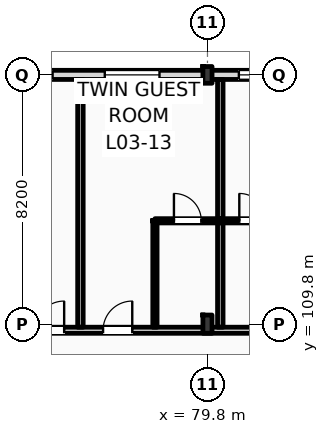
"""IFC4 building model, lengths in metres.
Left out: names, types, materials, properties, quantities, classifications, styles, units other than length and angle.
Written with IfcOpenShell. Run it as: python <this file> out.ifc"""

import sys

from ifc_helpers import new_model, si_unit, direction, frame, frame_2d, origin, origin_2d, place, context, subcontext, project, spatial, rectangle, i_section, extrude, element, fill, save


model = new_model("IFC4")
c1 = context("Model", 3, precision=1e-05, world=origin(), true_north=direction((0.0, 1.0)))
c2 = subcontext(c1, "Body", "Model", "MODEL_VIEW")
j1 = project(units=[si_unit("LENGTHUNIT", "METRE"), si_unit("PLANEANGLEUNIT", "RADIAN")], contexts=[c1])
p1 = place(None, origin())
s1 = spatial("IfcSite", under=j1, at=p1, CompositionType="ELEMENT")
p2 = place(p1, origin())
s2 = spatial("IfcBuilding", under=s1, at=p2, CompositionType="ELEMENT")
p3 = place(p2, frame((0.0, 0.0, 16.2)))
s3 = spatial("IfcBuildingStorey", under=s2, at=p3, CompositionType="ELEMENT", Elevation=16.2)
p4 = place(p3, frame((79.8, 109.8, 0.0), z_axis=(0.0, 0.0, 1.0), x_axis=(1.0, 0.0, 0.0)))
e1 = element("IfcColumn", 1, at=p4, inside=s3, PredefinedType="COLUMN", context=c2, shape_type="SweptSolid", body=[
    extrude(i_section(OverallWidth=0.3, OverallDepth=0.6, WebThickness=0.015, FlangeThickness=0.03, FilletRadius=0.027, at=origin_2d()), origin(), (0.0, 0.0, 1.0), 4.2),
])
p5 = place(p3, frame((79.8, 118.0, 0.0), z_axis=(0.0, 0.0, 1.0), x_axis=(1.0, 0.0, 0.0)))
e2 = element("IfcColumn", 2, at=p5, inside=s3, PredefinedType="COLUMN", context=c2, shape_type="SweptSolid", body=[
    extrude(i_section(OverallWidth=0.3, OverallDepth=0.55, WebThickness=0.015, FlangeThickness=0.029, FilletRadius=0.027, at=origin_2d()), origin(), (0.0, 0.0, 1.0), 4.2),
])
p6 = place(p3, frame((22.5, 118.0, 0.0), z_axis=(0.0, 0.0, 1.0), x_axis=(1.0, 0.0, 0.0)))
e3 = element("IfcWall", 3, at=p6, inside=s3, PredefinedType="STANDARD", context=c2, shape_type="SweptSolid", body=[
    extrude(rectangle(XDim=97.5, YDim=0.3, at=frame_2d((48.75, 0.0))), origin(), (0.0, 0.0, 1.0), 3.36),
])
p7 = place(p6, frame((3.721, 0.0, 0.9)))
e4 = element("IfcOpeningElement", 4, at=p7, cuts=e3, PredefinedType="OPENING", context=c2, shape_type="SweptSolid", body=[
    extrude(rectangle(XDim=0.9, YDim=1.8, at=frame_2d((0.45, 0.9))), frame((0.0, 0.16, 0.0), z_axis=(0.0, -1.0, 0.0), x_axis=(1.0, 0.0, 0.0)), (0.0, 0.0, 1.0), 0.32),
])
p8 = place(p6, frame((6.447, 0.0, 0.9)))
e5 = element("IfcOpeningElement", 5, at=p8, cuts=e3, PredefinedType="OPENING", context=c2, shape_type="SweptSolid", body=[
    extrude(rectangle(XDim=1.35, YDim=1.85, at=frame_2d((0.675, 0.925))), frame((0.0, 0.16, 0.0), z_axis=(0.0, -1.0, 0.0), x_axis=(1.0, 0.0, 0.0)), (0.0, 0.0, 1.0), 0.32),
])
p9 = place(p6, frame((11.363, 0.0, 0.9)))
e6 = element("IfcOpeningElement", 6, at=p9, cuts=e3, PredefinedType="OPENING", context=c2, shape_type="SweptSolid", body=[
    extrude(rectangle(XDim=1.5, YDim=1.9, at=frame_2d((0.75, 0.95))), frame((0.0, 0.16, 0.0), z_axis=(0.0, -1.0, 0.0), x_axis=(1.0, 0.0, 0.0)), (0.0, 0.0, 1.0), 0.32),
])
p10 = place(p6, frame((15.078, 0.0, 0.9)))
e7 = element("IfcOpeningElement", 7, at=p10, cuts=e3, PredefinedType="OPENING", context=c2, shape_type="SweptSolid", body=[
    extrude(rectangle(XDim=1.65, YDim=1.95, at=frame_2d((0.825, 0.975))), frame((0.0, 0.16, 0.0), z_axis=(0.0, -1.0, 0.0), x_axis=(1.0, 0.0, 0.0)), (0.0, 0.0, 1.0), 0.32),
])
p11 = place(p6, frame((19.395, 0.0, 0.9)))
e8 = element("IfcOpeningElement", 8, at=p11, cuts=e3, PredefinedType="OPENING", context=c2, shape_type="SweptSolid", body=[
    extrude(rectangle(XDim=1.8, YDim=2.0, at=frame_2d((0.9, 1.0))), frame((0.0, 0.16, 0.0), z_axis=(0.0, -1.0, 0.0), x_axis=(1.0, 0.0, 0.0)), (0.0, 0.0, 1.0), 0.32),
])
p12 = place(p6, frame((23.31, 0.0, 0.9)))
e9 = element("IfcOpeningElement", 9, at=p12, cuts=e3, PredefinedType="OPENING", context=c2, shape_type="SweptSolid", body=[
    extrude(rectangle(XDim=1.95, YDim=2.05, at=frame_2d((0.975, 1.025))), frame((0.0, 0.16, 0.0), z_axis=(0.0, -1.0, 0.0), x_axis=(1.0, 0.0, 0.0)), (0.0, 0.0, 1.0), 0.32),
])
p13 = place(p6, frame((28.026, 0.0, 0.9)))
e10 = element("IfcOpeningElement", 10, at=p13, cuts=e3, PredefinedType="OPENING", context=c2, shape_type="SweptSolid", body=[
    extrude(rectangle(XDim=2.1, YDim=2.1, at=frame_2d((1.05, 1.05))), frame((0.0, 0.16, 0.0), z_axis=(0.0, -1.0, 0.0), x_axis=(1.0, 0.0, 0.0)), (0.0, 0.0, 1.0), 0.32),
])
p14 = place(p6, frame((31.941, 0.0, 0.9)))
e11 = element("IfcOpeningElement", 11, at=p14, cuts=e3, PredefinedType="OPENING", context=c2, shape_type="SweptSolid", body=[
    extrude(rectangle(XDim=1.1, YDim=2.15, at=frame_2d((0.55, 1.075))), frame((0.0, 0.16, 0.0), z_axis=(0.0, -1.0, 0.0), x_axis=(1.0, 0.0, 0.0)), (0.0, 0.0, 1.0), 0.32),
])
p15 = place(p6, frame((36.657, 0.0, 0.9)))
e12 = element("IfcOpeningElement", 12, at=p15, cuts=e3, PredefinedType="OPENING", context=c2, shape_type="SweptSolid", body=[
    extrude(rectangle(XDim=2.4, YDim=2.2, at=frame_2d((1.2, 1.1))), frame((0.0, 0.16, 0.0), z_axis=(0.0, -1.0, 0.0), x_axis=(1.0, 0.0, 0.0)), (0.0, 0.0, 1.0), 0.32),
])
p16 = place(p6, frame((42.574, 0.0, 0.9)))
e13 = element("IfcOpeningElement", 13, at=p16, cuts=e3, PredefinedType="OPENING", context=c2, shape_type="SweptSolid", body=[
    extrude(rectangle(XDim=1.35, YDim=2.25, at=frame_2d((0.675, 1.125))), frame((0.0, 0.16, 0.0), z_axis=(0.0, -1.0, 0.0), x_axis=(1.0, 0.0, 0.0)), (0.0, 0.0, 1.0), 0.32),
])
p17 = place(p6, frame((45.289, 0.0, 0.9)))
e14 = element("IfcOpeningElement", 14, at=p17, cuts=e3, PredefinedType="OPENING", context=c2, shape_type="SweptSolid", body=[
    extrude(rectangle(XDim=2.7, YDim=2.28, at=frame_2d((1.35, 1.14))), frame((0.0, 0.16, 0.0), z_axis=(0.0, -1.0, 0.0), x_axis=(1.0, 0.0, 0.0)), (0.0, 0.0, 1.0), 0.32),
])
p18 = place(p6, frame((50.406, 0.0, 0.9)))
e15 = element("IfcOpeningElement", 15, at=p18, cuts=e3, PredefinedType="OPENING", context=c2, shape_type="SweptSolid", body=[
    extrude(rectangle(XDim=1.8, YDim=2.28, at=frame_2d((0.9, 1.14))), frame((0.0, 0.16, 0.0), z_axis=(0.0, -1.0, 0.0), x_axis=(1.0, 0.0, 0.0)), (0.0, 0.0, 1.0), 0.32),
])
p19 = place(p6, frame((53.922, 0.0, 0.9)))
e16 = element("IfcOpeningElement", 16, at=p19, cuts=e3, PredefinedType="OPENING", context=c2, shape_type="SweptSolid", body=[
    extrude(rectangle(XDim=1.8, YDim=2.28, at=frame_2d((0.9, 1.14))), frame((0.0, 0.16, 0.0), z_axis=(0.0, -1.0, 0.0), x_axis=(1.0, 0.0, 0.0)), (0.0, 0.0, 1.0), 0.32),
])
p20 = place(p6, frame((58.332, 0.0, 0.9)))
e17 = element("IfcOpeningElement", 17, at=p20, cuts=e3, PredefinedType="OPENING", context=c2, shape_type="SweptSolid", body=[
    extrude(rectangle(XDim=2.961, YDim=2.28, at=frame_2d((1.48, 1.14))), frame((0.0, 0.16, 0.0), z_axis=(0.0, -1.0, 0.0), x_axis=(1.0, 0.0, 0.0)), (0.0, 0.0, 1.0), 0.32),
])
p21 = place(p6, frame((62.513, 0.0, 0.9)))
e18 = element("IfcOpeningElement", 18, at=p21, cuts=e3, PredefinedType="OPENING", context=c2, shape_type="SweptSolid", body=[
    extrude(rectangle(XDim=1.8, YDim=2.28, at=frame_2d((0.9, 1.14))), frame((0.0, 0.16, 0.0), z_axis=(0.0, -1.0, 0.0), x_axis=(1.0, 0.0, 0.0)), (0.0, 0.0, 1.0), 0.32),
])
p22 = place(p6, frame((67.114, 0.0, 0.9)))
e19 = element("IfcOpeningElement", 19, at=p22, cuts=e3, PredefinedType="OPENING", context=c2, shape_type="SweptSolid", body=[
    extrude(rectangle(XDim=2.961, YDim=2.28, at=frame_2d((1.48, 1.14))), frame((0.0, 0.16, 0.0), z_axis=(0.0, -1.0, 0.0), x_axis=(1.0, 0.0, 0.0)), (0.0, 0.0, 1.0), 0.32),
])
p23 = place(p6, frame((73.695, 0.0, 0.9)))
e20 = element("IfcOpeningElement", 20, at=p23, cuts=e3, PredefinedType="OPENING", context=c2, shape_type="SweptSolid", body=[
    extrude(rectangle(XDim=1.1, YDim=2.28, at=frame_2d((0.55, 1.14))), frame((0.0, 0.16, 0.0), z_axis=(0.0, -1.0, 0.0), x_axis=(1.0, 0.0, 0.0)), (0.0, 0.0, 1.0), 0.32),
])
p24 = place(p6, frame((75.895, 0.0, 0.9)))
e21 = element("IfcOpeningElement", 21, at=p24, cuts=e3, PredefinedType="OPENING", context=c2, shape_type="SweptSolid", body=[
    extrude(rectangle(XDim=2.961, YDim=2.28, at=frame_2d((1.48, 1.14))), frame((0.0, 0.16, 0.0), z_axis=(0.0, -1.0, 0.0), x_axis=(1.0, 0.0, 0.0)), (0.0, 0.0, 1.0), 0.32),
])
p25 = place(p6, frame((81.676, 0.0, 0.9)))
e22 = element("IfcOpeningElement", 22, at=p25, cuts=e3, PredefinedType="OPENING", context=c2, shape_type="SweptSolid", body=[
    extrude(rectangle(XDim=1.8, YDim=2.28, at=frame_2d((0.9, 1.14))), frame((0.0, 0.16, 0.0), z_axis=(0.0, -1.0, 0.0), x_axis=(1.0, 0.0, 0.0)), (0.0, 0.0, 1.0), 0.32),
])
p26 = place(p6, frame((84.677, 0.0, 0.9)))
e23 = element("IfcOpeningElement", 23, at=p26, cuts=e3, PredefinedType="OPENING", context=c2, shape_type="SweptSolid", body=[
    extrude(rectangle(XDim=2.961, YDim=2.28, at=frame_2d((1.48, 1.14))), frame((0.0, 0.16, 0.0), z_axis=(0.0, -1.0, 0.0), x_axis=(1.0, 0.0, 0.0)), (0.0, 0.0, 1.0), 0.32),
])
p27 = place(p6, frame((89.999, 0.0, 0.9)))
e24 = element("IfcOpeningElement", 24, at=p27, cuts=e3, PredefinedType="OPENING", context=c2, shape_type="SweptSolid", body=[
    extrude(rectangle(XDim=1.1, YDim=1.5, at=frame_2d((0.55, 0.75))), frame((0.0, 0.16, 0.0), z_axis=(0.0, -1.0, 0.0), x_axis=(1.0, 0.0, 0.0)), (0.0, 0.0, 1.0), 0.32),
])
p28 = place(p6, frame((94.35, 0.0, 0.9)))
e25 = element("IfcOpeningElement", 25, at=p28, cuts=e3, PredefinedType="OPENING", context=c2, shape_type="SweptSolid", body=[
    extrude(rectangle(XDim=1.25, YDim=1.6, at=frame_2d((0.625, 0.8))), frame((0.0, 0.16, 0.0), z_axis=(0.0, -1.0, 0.0), x_axis=(1.0, 0.0, 0.0)), (0.0, 0.0, 1.0), 0.32),
])
p29 = place(p3, frame((10.65, 109.6, 0.0), z_axis=(0.0, 0.0, 1.0), x_axis=(1.0, 0.0, 0.0)))
e26 = element("IfcWall", 26, at=p29, inside=s3, PredefinedType="PARTITIONING", context=c2, shape_type="SweptSolid", body=[
    extrude(rectangle(XDim=109.21, YDim=0.2, at=frame_2d((54.605, 0.0))), origin(), (0.0, 0.0, 1.0), 3.36),
])
p30 = place(p29, frame((15.43, 0.0, 0.0)))
e27 = element("IfcOpeningElement", 27, at=p30, cuts=e26, PredefinedType="OPENING", context=c2, shape_type="SweptSolid", body=[
    extrude(rectangle(XDim=1.02, YDim=2.2, at=frame_2d((0.51, 1.1))), frame((0.0, 0.11, 0.0), z_axis=(0.0, -1.0, 0.0), x_axis=(1.0, 0.0, 0.0)), (0.0, 0.0, 1.0), 0.22),
])
p31 = place(p29, frame((19.537, 0.0, 0.0)))
e28 = element("IfcOpeningElement", 28, at=p31, cuts=e26, PredefinedType="OPENING", context=c2, shape_type="SweptSolid", body=[
    extrude(rectangle(XDim=1.02, YDim=2.2, at=frame_2d((0.51, 1.1))), frame((0.0, 0.11, 0.0), z_axis=(0.0, -1.0, 0.0), x_axis=(1.0, 0.0, 0.0)), (0.0, 0.0, 1.0), 0.22),
])
p32 = place(p29, frame((23.928, 0.0, 0.0)))
e29 = element("IfcOpeningElement", 29, at=p32, cuts=e26, PredefinedType="OPENING", context=c2, shape_type="SweptSolid", body=[
    extrude(rectangle(XDim=1.02, YDim=2.2, at=frame_2d((0.51, 1.1))), frame((0.0, 0.11, 0.0), z_axis=(0.0, -1.0, 0.0), x_axis=(1.0, 0.0, 0.0)), (0.0, 0.0, 1.0), 0.22),
])
p33 = place(p29, frame((26.169, 0.0, 0.0)))
e30 = element("IfcOpeningElement", 30, at=p33, cuts=e26, PredefinedType="OPENING", context=c2, shape_type="SweptSolid", body=[
    extrude(rectangle(XDim=1.02, YDim=2.2, at=frame_2d((0.51, 1.1))), frame((0.0, 0.11, 0.0), z_axis=(0.0, -1.0, 0.0), x_axis=(1.0, 0.0, 0.0)), (0.0, 0.0, 1.0), 0.22),
])
p34 = place(p29, frame((32.739, 0.0, 0.0)))
e31 = element("IfcOpeningElement", 31, at=p34, cuts=e26, PredefinedType="OPENING", context=c2, shape_type="SweptSolid", body=[
    extrude(rectangle(XDim=0.96, YDim=2.2, at=frame_2d((0.48, 1.1))), frame((0.0, 0.11, 0.0), z_axis=(0.0, -1.0, 0.0), x_axis=(1.0, 0.0, 0.0)), (0.0, 0.0, 1.0), 0.22),
])
p35 = place(p29, frame((34.98, 0.0, 0.0)))
e32 = element("IfcOpeningElement", 32, at=p35, cuts=e26, PredefinedType="OPENING", context=c2, shape_type="SweptSolid", body=[
    extrude(rectangle(XDim=0.96, YDim=2.2, at=frame_2d((0.48, 1.1))), frame((0.0, 0.11, 0.0), z_axis=(0.0, -1.0, 0.0), x_axis=(1.0, 0.0, 0.0)), (0.0, 0.0, 1.0), 0.22),
])
p36 = place(p29, frame((41.521, 0.0, 0.0)))
e33 = element("IfcOpeningElement", 33, at=p36, cuts=e26, PredefinedType="OPENING", context=c2, shape_type="SweptSolid", body=[
    extrude(rectangle(XDim=0.96, YDim=2.2, at=frame_2d((0.48, 1.1))), frame((0.0, 0.11, 0.0), z_axis=(0.0, -1.0, 0.0), x_axis=(1.0, 0.0, 0.0)), (0.0, 0.0, 1.0), 0.22),
])
p37 = place(p29, frame((43.512, 0.0, 0.0)))
e34 = element("IfcOpeningElement", 34, at=p37, cuts=e26, PredefinedType="OPENING", context=c2, shape_type="SweptSolid", body=[
    extrude(rectangle(XDim=0.96, YDim=2.2, at=frame_2d((0.48, 1.1))), frame((0.0, 0.11, 0.0), z_axis=(0.0, -1.0, 0.0), x_axis=(1.0, 0.0, 0.0)), (0.0, 0.0, 1.0), 0.22),
])
p38 = place(p29, frame((50.303, 0.0, 0.0)))
e35 = element("IfcOpeningElement", 35, at=p38, cuts=e26, PredefinedType="OPENING", context=c2, shape_type="SweptSolid", body=[
    extrude(rectangle(XDim=0.96, YDim=2.2, at=frame_2d((0.48, 1.1))), frame((0.0, 0.11, 0.0), z_axis=(0.0, -1.0, 0.0), x_axis=(1.0, 0.0, 0.0)), (0.0, 0.0, 1.0), 0.22),
])
p39 = place(p29, frame((54.944, 0.0, 0.0)))
e36 = element("IfcOpeningElement", 36, at=p39, cuts=e26, PredefinedType="OPENING", context=c2, shape_type="SweptSolid", body=[
    extrude(rectangle(XDim=0.96, YDim=2.2, at=frame_2d((0.48, 1.1))), frame((0.0, 0.11, 0.0), z_axis=(0.0, -1.0, 0.0), x_axis=(1.0, 0.0, 0.0)), (0.0, 0.0, 1.0), 0.22),
])
p40 = place(p29, frame((59.085, 0.0, 0.0)))
e37 = element("IfcOpeningElement", 37, at=p40, cuts=e26, PredefinedType="OPENING", context=c2, shape_type="SweptSolid", body=[
    extrude(rectangle(XDim=0.96, YDim=2.2, at=frame_2d((0.48, 1.1))), frame((0.0, 0.11, 0.0), z_axis=(0.0, -1.0, 0.0), x_axis=(1.0, 0.0, 0.0)), (0.0, 0.0, 1.0), 0.22),
])
p41 = place(p29, frame((63.476, 0.0, 0.0)))
e38 = element("IfcOpeningElement", 38, at=p41, cuts=e26, PredefinedType="OPENING", context=c2, shape_type="SweptSolid", body=[
    extrude(rectangle(XDim=0.96, YDim=2.2, at=frame_2d((0.48, 1.1))), frame((0.0, 0.11, 0.0), z_axis=(0.0, -1.0, 0.0), x_axis=(1.0, 0.0, 0.0)), (0.0, 0.0, 1.0), 0.22),
])
p42 = place(p29, frame((65.716, 0.0, 0.0)))
e39 = element("IfcOpeningElement", 39, at=p42, cuts=e26, PredefinedType="OPENING", context=c2, shape_type="SweptSolid", body=[
    extrude(rectangle(XDim=0.96, YDim=2.2, at=frame_2d((0.48, 1.1))), frame((0.0, 0.11, 0.0), z_axis=(0.0, -1.0, 0.0), x_axis=(1.0, 0.0, 0.0)), (0.0, 0.0, 1.0), 0.22),
])
p43 = place(p29, frame((72.257, 0.0, 0.0)))
e40 = element("IfcOpeningElement", 40, at=p43, cuts=e26, PredefinedType="OPENING", context=c2, shape_type="SweptSolid", body=[
    extrude(rectangle(XDim=0.96, YDim=2.2, at=frame_2d((0.48, 1.1))), frame((0.0, 0.11, 0.0), z_axis=(0.0, -1.0, 0.0), x_axis=(1.0, 0.0, 0.0)), (0.0, 0.0, 1.0), 0.22),
])
p44 = place(p29, frame((74.498, 0.0, 0.0)))
e41 = element("IfcOpeningElement", 41, at=p44, cuts=e26, PredefinedType="OPENING", context=c2, shape_type="SweptSolid", body=[
    extrude(rectangle(XDim=0.96, YDim=2.2, at=frame_2d((0.48, 1.1))), frame((0.0, 0.11, 0.0), z_axis=(0.0, -1.0, 0.0), x_axis=(1.0, 0.0, 0.0)), (0.0, 0.0, 1.0), 0.22),
])
p45 = place(p29, frame((81.039, 0.0, 0.0)))
e42 = element("IfcOpeningElement", 42, at=p45, cuts=e26, PredefinedType="OPENING", context=c2, shape_type="SweptSolid", body=[
    extrude(rectangle(XDim=0.96, YDim=2.2, at=frame_2d((0.48, 1.1))), frame((0.0, 0.11, 0.0), z_axis=(0.0, -1.0, 0.0), x_axis=(1.0, 0.0, 0.0)), (0.0, 0.0, 1.0), 0.22),
])
p46 = place(p29, frame((85.68, 0.0, 0.0)))
e43 = element("IfcOpeningElement", 43, at=p46, cuts=e26, PredefinedType="OPENING", context=c2, shape_type="SweptSolid", body=[
    extrude(rectangle(XDim=0.96, YDim=2.2, at=frame_2d((0.48, 1.1))), frame((0.0, 0.11, 0.0), z_axis=(0.0, -1.0, 0.0), x_axis=(1.0, 0.0, 0.0)), (0.0, 0.0, 1.0), 0.22),
])
p47 = place(p29, frame((89.82, 0.0, 0.0)))
e44 = element("IfcOpeningElement", 44, at=p47, cuts=e26, PredefinedType="OPENING", context=c2, shape_type="SweptSolid", body=[
    extrude(rectangle(XDim=0.96, YDim=2.2, at=frame_2d((0.48, 1.1))), frame((0.0, 0.11, 0.0), z_axis=(0.0, -1.0, 0.0), x_axis=(1.0, 0.0, 0.0)), (0.0, 0.0, 1.0), 0.22),
])
p48 = place(p29, frame((94.211, 0.0, 0.0)))
e45 = element("IfcOpeningElement", 45, at=p48, cuts=e26, PredefinedType="OPENING", context=c2, shape_type="SweptSolid", body=[
    extrude(rectangle(XDim=0.96, YDim=2.2, at=frame_2d((0.48, 1.1))), frame((0.0, 0.11, 0.0), z_axis=(0.0, -1.0, 0.0), x_axis=(1.0, 0.0, 0.0)), (0.0, 0.0, 1.0), 0.22),
])
p49 = place(p29, frame((98.602, 0.0, 0.0)))
e46 = element("IfcOpeningElement", 46, at=p49, cuts=e26, PredefinedType="OPENING", context=c2, shape_type="SweptSolid", body=[
    extrude(rectangle(XDim=0.96, YDim=2.2, at=frame_2d((0.48, 1.1))), frame((0.0, 0.11, 0.0), z_axis=(0.0, -1.0, 0.0), x_axis=(1.0, 0.0, 0.0)), (0.0, 0.0, 1.0), 0.22),
])
p50 = place(p29, frame((102.993, 0.0, 0.0)))
e47 = element("IfcOpeningElement", 47, at=p50, cuts=e26, PredefinedType="OPENING", context=c2, shape_type="SweptSolid", body=[
    extrude(rectangle(XDim=0.96, YDim=2.2, at=frame_2d((0.48, 1.1))), frame((0.0, 0.11, 0.0), z_axis=(0.0, -1.0, 0.0), x_axis=(1.0, 0.0, 0.0)), (0.0, 0.0, 1.0), 0.22),
])
p51 = place(p29, frame((105.269, 0.0, 0.0)))
e48 = element("IfcOpeningElement", 48, at=p51, cuts=e26, PredefinedType="OPENING", context=c2, shape_type="SweptSolid", body=[
    extrude(rectangle(XDim=0.96, YDim=2.2, at=frame_2d((0.48, 1.1))), frame((0.0, 0.11, 0.0), z_axis=(0.0, -1.0, 0.0), x_axis=(1.0, 0.0, 0.0)), (0.0, 0.0, 1.0), 0.22),
])
p52 = place(p29, frame((2.716, 0.0, 0.0)))
e49 = element("IfcOpeningElement", 49, at=p52, cuts=e26, PredefinedType="OPENING", context=c2, shape_type="SweptSolid", body=[
    extrude(rectangle(XDim=1.35, YDim=2.25, at=frame_2d((0.675, 1.125))), frame((0.0, 0.11, 0.0), z_axis=(0.0, -1.0, 0.0), x_axis=(1.0, 0.0, 0.0)), (0.0, 0.0, 1.0), 0.22),
])
p53 = place(p29, frame((6.65, 0.0, 0.0)))
e50 = element("IfcOpeningElement", 50, at=p53, cuts=e26, PredefinedType="OPENING", context=c2, shape_type="SweptSolid", body=[
    extrude(rectangle(XDim=1.35, YDim=2.25, at=frame_2d((0.675, 1.125))), frame((0.0, 0.11, 0.0), z_axis=(0.0, -1.0, 0.0), x_axis=(1.0, 0.0, 0.0)), (0.0, 0.0, 1.0), 0.22),
])
p54 = place(p29, frame((10.583, 0.0, 0.0)))
e51 = element("IfcOpeningElement", 51, at=p54, cuts=e26, PredefinedType="OPENING", context=c2, shape_type="SweptSolid", body=[
    extrude(rectangle(XDim=1.35, YDim=2.25, at=frame_2d((0.675, 1.125))), frame((0.0, 0.11, 0.0), z_axis=(0.0, -1.0, 0.0), x_axis=(1.0, 0.0, 0.0)), (0.0, 0.0, 1.0), 0.22),
])
for number, where, z_axis, x_axis in (
    (52, (75.621, 109.7, 0.0), (0.0, 0.0, 1.0), (0.0, 1.0, 0.0)),
    (53, (80.222, 109.7, 0.0), (0.0, 0.0, 1.0), (0.0, 1.0, 0.0)),
):
    element("IfcWall", number, at=place(p3, frame(where, z_axis=z_axis, x_axis=x_axis)), inside=s3, PredefinedType="PARTITIONING", context=c2, shape_type="SweptSolid", body=[
        extrude(rectangle(XDim=8.15, YDim=0.18, at=frame_2d((4.075, 0.0))), origin(), (0.0, 0.0, 1.0), 3.92),
    ])
p55 = place(p3, frame((78.072, 109.7, 0.0), z_axis=(0.0, 0.0, 1.0), x_axis=(0.0, 1.0, 0.0)))
e54 = element("IfcWall", 54, at=p55, inside=s3, PredefinedType="PARTITIONING", context=c2, shape_type="SweptSolid", body=[
    extrude(rectangle(XDim=3.5, YDim=0.14, at=frame_2d((1.75, 0.0))), origin(), (0.0, 0.0, 1.0), 3.92),
])
p56 = place(p3, frame((78.072, 113.2, 0.0), z_axis=(0.0, 0.0, 1.0), x_axis=(1.0, 0.0, 0.0)))
e55 = element("IfcWall", 55, at=p56, inside=s3, PredefinedType="PARTITIONING", context=c2, shape_type="SweptSolid", body=[
    extrude(rectangle(XDim=2.15, YDim=0.14, at=frame_2d((1.075, 0.0))), origin(), (0.0, 0.0, 1.0), 3.92),
])
p57 = place(p56, frame((0.625, 0.0, 0.0)))
e56 = element("IfcOpeningElement", 56, at=p57, cuts=e55, PredefinedType="OPENING", context=c2, shape_type="SweptSolid", body=[
    extrude(rectangle(XDim=0.9, YDim=2.1, at=frame_2d((0.45, 1.05))), frame((0.0, 0.08, 0.0), z_axis=(0.0, -1.0, 0.0), x_axis=(1.0, 0.0, 0.0)), (0.0, 0.0, 1.0), 0.16),
])
p58 = place(p3, frame((80.222, 113.2, 0.0), z_axis=(0.0, 0.0, 1.0), x_axis=(1.0, 0.0, 0.0)))
e57 = element("IfcWall", 57, at=p58, inside=s3, PredefinedType="PARTITIONING", context=c2, shape_type="SweptSolid", body=[
    extrude(rectangle(XDim=2.15, YDim=0.14, at=frame_2d((1.075, 0.0))), origin(), (0.0, 0.0, 1.0), 3.92),
])
p59 = place(p58, frame((0.625, 0.0, 0.0)))
e58 = element("IfcOpeningElement", 58, at=p59, cuts=e57, PredefinedType="OPENING", context=c2, shape_type="SweptSolid", body=[
    extrude(rectangle(XDim=0.9, YDim=2.1, at=frame_2d((0.45, 1.05))), frame((0.0, 0.08, 0.0), z_axis=(0.0, -1.0, 0.0), x_axis=(1.0, 0.0, 0.0)), (0.0, 0.0, 1.0), 0.16),
])
p60 = place(p18, origin())
e59 = element("IfcWindow", 59, at=p60, inside=s3, PartitioningType="DOUBLE_PANEL_VERTICAL", PredefinedType="WINDOW", context=c2, shape_type="SweptSolid", body=[
    extrude(rectangle(XDim=1.8, YDim=2.28, at=frame_2d((0.9, 1.14))), frame((0.0, 0.03, 0.0), z_axis=(0.0, -1.0, 0.0), x_axis=(1.0, 0.0, 0.0)), (0.0, 0.0, 1.0), 0.06),
])
fill(e15, e59)
p61 = place(p19, origin())
e60 = element("IfcWindow", 60, at=p61, inside=s3, PartitioningType="DOUBLE_PANEL_VERTICAL", PredefinedType="WINDOW", context=c2, shape_type="SweptSolid", body=[
    extrude(rectangle(XDim=1.8, YDim=2.28, at=frame_2d((0.9, 1.14))), frame((0.0, 0.03, 0.0), z_axis=(0.0, -1.0, 0.0), x_axis=(1.0, 0.0, 0.0)), (0.0, 0.0, 1.0), 0.06),
])
fill(e16, e60)
p62 = place(p20, origin())
e61 = element("IfcWindow", 61, at=p62, inside=s3, PartitioningType="DOUBLE_PANEL_VERTICAL", PredefinedType="WINDOW", context=c2, shape_type="SweptSolid", body=[
    extrude(rectangle(XDim=2.961, YDim=2.28, at=frame_2d((1.48, 1.14))), frame((0.0, 0.03, 0.0), z_axis=(0.0, -1.0, 0.0), x_axis=(1.0, 0.0, 0.0)), (0.0, 0.0, 1.0), 0.06),
])
fill(e17, e61)
p63 = place(p41, origin())
e62 = element("IfcDoor", 62, at=p63, inside=s3, OperationType="SINGLE_SWING_RIGHT", PredefinedType="DOOR", context=c2, shape_type="SweptSolid", body=[
    extrude(rectangle(XDim=0.96, YDim=2.2, at=frame_2d((0.48, 1.1))), frame((0.0, 0.025, 0.0), z_axis=(0.0, -1.0, 0.0), x_axis=(1.0, 0.0, 0.0)), (0.0, 0.0, 1.0), 0.05),
])
fill(e38, e62)
p64 = place(p42, origin())
e63 = element("IfcDoor", 63, at=p64, inside=s3, OperationType="SINGLE_SWING_RIGHT", PredefinedType="DOOR", context=c2, shape_type="SweptSolid", body=[
    extrude(rectangle(XDim=0.96, YDim=2.2, at=frame_2d((0.48, 1.1))), frame((0.0, 0.025, 0.0), z_axis=(0.0, -1.0, 0.0), x_axis=(1.0, 0.0, 0.0)), (0.0, 0.0, 1.0), 0.05),
])
fill(e39, e63)
p65 = place(p57, origin())
e64 = element("IfcDoor", 64, at=p65, inside=s3, OperationType="SINGLE_SWING_LEFT", PredefinedType="DOOR", context=c2, shape_type="SweptSolid", body=[
    extrude(rectangle(XDim=0.9, YDim=2.1, at=frame_2d((0.45, 1.05))), frame((0.0, 0.025, 0.0), z_axis=(0.0, -1.0, 0.0), x_axis=(1.0, 0.0, 0.0)), (0.0, 0.0, 1.0), 0.05),
])
fill(e56, e64)
p66 = place(p59, origin())
e65 = element("IfcDoor", 65, at=p66, inside=s3, OperationType="SINGLE_SWING_LEFT", PredefinedType="DOOR", context=c2, shape_type="SweptSolid", body=[
    extrude(rectangle(XDim=0.9, YDim=2.1, at=frame_2d((0.45, 1.05))), frame((0.0, 0.025, 0.0), z_axis=(0.0, -1.0, 0.0), x_axis=(1.0, 0.0, 0.0)), (0.0, 0.0, 1.0), 0.05),
])
fill(e58, e65)
save(model, sys.argv[1])
